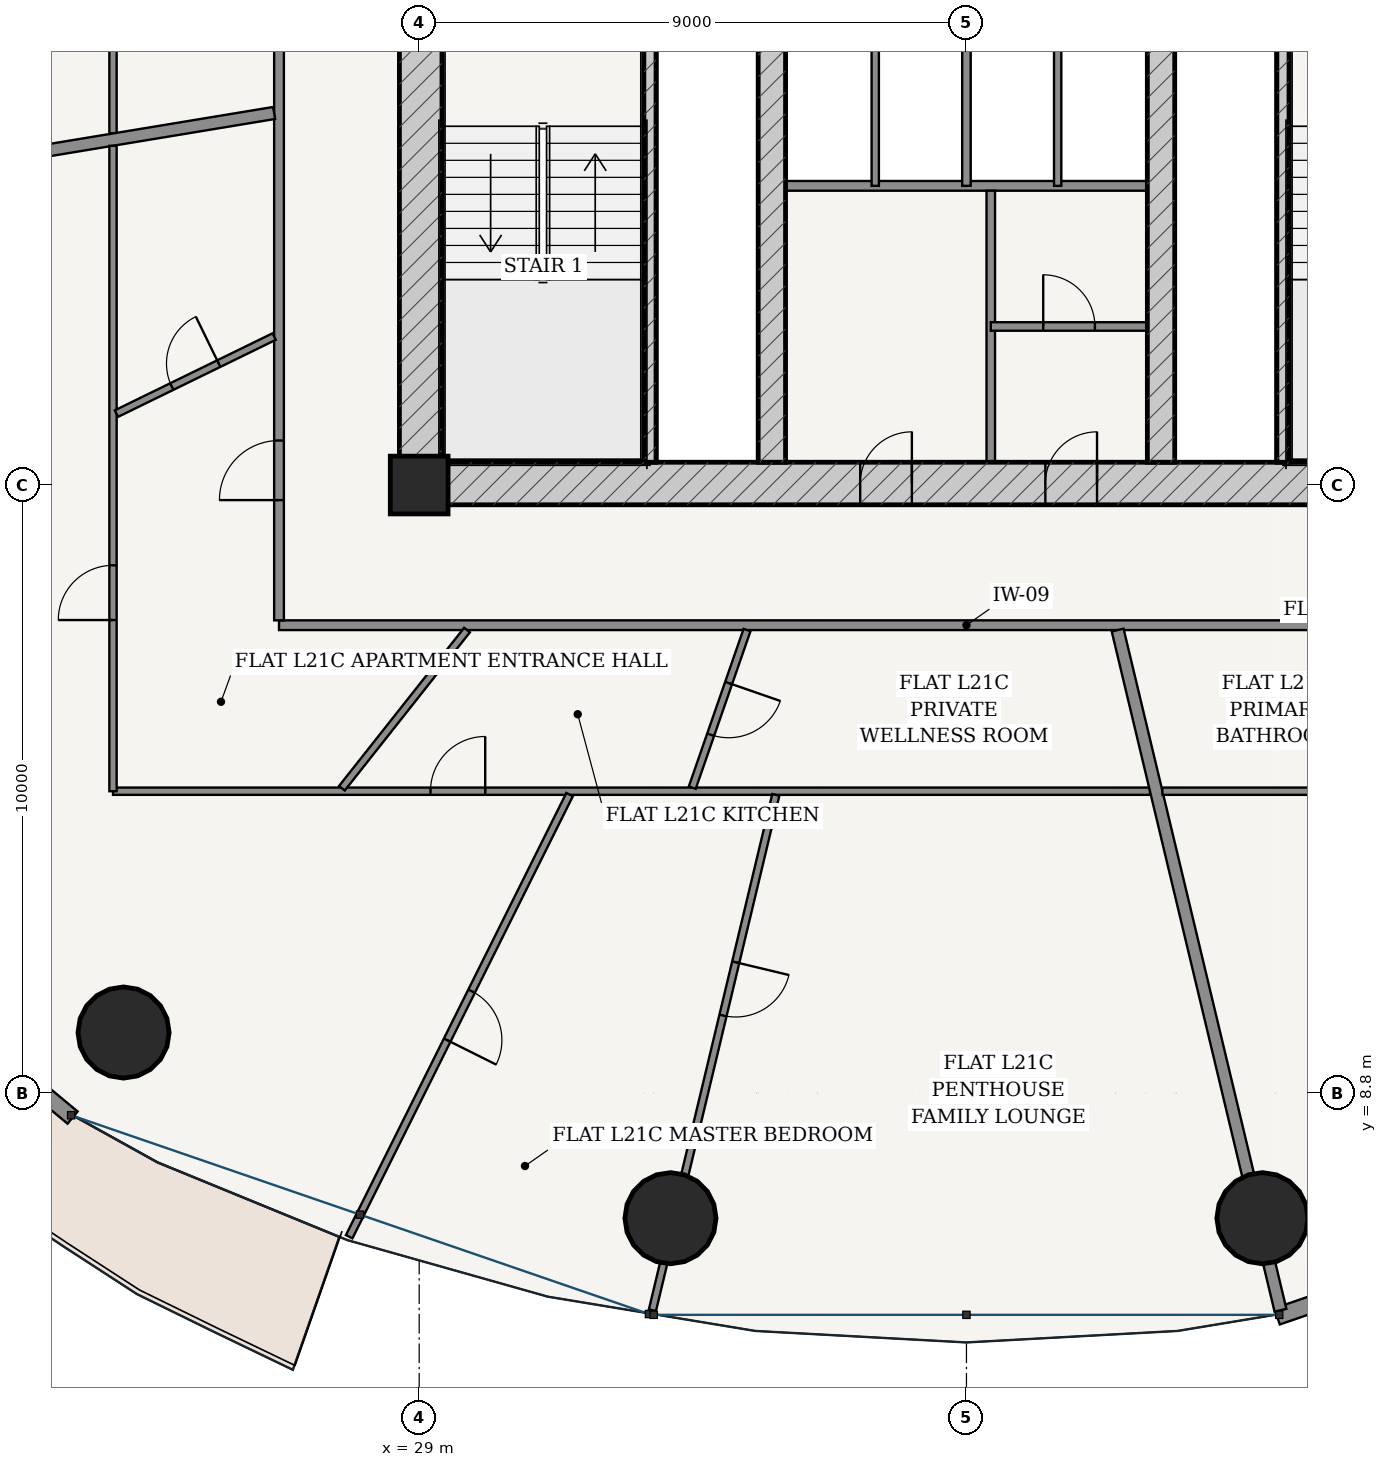
"""IFC4 building model, lengths in metres.
Left out: names, types, materials, properties, quantities, classifications, styles, units other than length and angle.
Written with IfcOpenShell. Run it as: python <this file> out.ifc"""

import sys

from ifc_helpers import new_model, si_unit, direction, frame, frame_2d, origin, origin_2d, place, context, subcontext, project, spatial, rectangle, hollow_circle, extrude, source, transform, mapped, element, fill, save


model = new_model("IFC4")
c1 = context("Model", 3, precision=1e-05, world=origin(), true_north=direction((-0.2419218956, 0.970295726276)))
c2 = subcontext(c1, "Body", "Model", "MODEL_VIEW")
j1 = project(units=[si_unit("LENGTHUNIT", "METRE"), si_unit("PLANEANGLEUNIT", "RADIAN")], contexts=[c1])
p1 = place(None, origin())
s1 = spatial("IfcSite", under=j1, at=p1, CompositionType="ELEMENT")
p2 = place(p1, origin())
s2 = spatial("IfcBuilding", under=s1, at=p2, CompositionType="ELEMENT")
p3 = place(p2, frame((0.0, 0.0, 83.4)))
s3 = spatial("IfcBuildingStorey", under=s2, at=p3, CompositionType="ELEMENT", Elevation=83.4)
p4 = place(p3, frame((29.0, 18.8, 0.0), z_axis=(0.0, 0.0, 1.0), x_axis=(1.0, 0.0, 0.0)))
e1 = element("IfcColumn", 1, at=p4, inside=s3, PredefinedType="COLUMN", context=c2, shape_type="SweptSolid", body=[
    extrude(rectangle(XDim=0.95, YDim=0.95, at=origin_2d()), origin(), (0.0, 0.0, 1.0), 3.6),
])
p5 = place(p3, frame((28.675, 18.825, 0.0), z_axis=(0.0, 0.0, 1.0), x_axis=(1.0, 0.0, 0.0)))
e2 = element("IfcWall", 2, at=p5, inside=s3, PredefinedType="SHEAR", context=c2, shape_type="SweptSolid", body=[
    extrude(rectangle(XDim=18.65, YDim=0.7, at=frame_2d((9.325, 0.0))), origin(), (0.0, 0.0, 1.0), 3.325),
])
p6 = place(p5, frame((7.577, 0.0, 0.0)))
e3 = element("IfcOpeningElement", 3, at=p6, cuts=e2, PredefinedType="OPENING", context=c2, shape_type="SweptSolid", body=[
    extrude(rectangle(XDim=0.85, YDim=2.1, at=frame_2d((0.425, 1.05))), frame((0.0, 0.36, 0.0), z_axis=(0.0, -1.0, 0.0), x_axis=(1.0, 0.0, 0.0)), (0.0, 0.0, 1.0), 0.72),
])
p7 = place(p5, frame((10.623, 0.0, 0.0)))
e4 = element("IfcOpeningElement", 4, at=p7, cuts=e2, PredefinedType="OPENING", context=c2, shape_type="SweptSolid", body=[
    extrude(rectangle(XDim=0.85, YDim=2.1, at=frame_2d((0.425, 1.05))), frame((0.0, 0.36, 0.0), z_axis=(0.0, -1.0, 0.0), x_axis=(1.0, 0.0, 0.0)), (0.0, 0.0, 1.0), 0.72),
])
p8 = place(p3, frame((29.025, 19.175, 0.0), z_axis=(0.0, 0.0, 1.0), x_axis=(0.0, 1.0, 0.0)))
e5 = element("IfcWall", 5, at=p8, inside=s3, PredefinedType="SHEAR", context=c2, shape_type="SweptSolid", body=[
    extrude(rectangle(XDim=15.25, YDim=0.7, at=frame_2d((7.625, 0.0))), origin(), (0.0, 0.0, 1.0), 3.325),
])
p9 = place(p8, frame((9.875, 0.0, 0.0)))
e6 = element("IfcOpeningElement", 6, at=p9, cuts=e5, PredefinedType="OPENING", context=c2, shape_type="SweptSolid", body=[
    extrude(rectangle(XDim=1.5, YDim=2.2, at=frame_2d((0.75, 1.1))), frame((0.0, 0.36, 0.0), z_axis=(0.0, -1.0, 0.0), x_axis=(1.0, 0.0, 0.0)), (0.0, 0.0, 1.0), 0.72),
])
for number, where, z_axis, x_axis in (
    (7, (32.795, 19.175, 0.0), (0.0, 0.0, 1.0), (0.0, 1.0, 0.0)),
    (8, (43.205, 19.175, 0.0), (0.0, 0.0, 1.0), (0.0, 1.0, 0.0)),
):
    element("IfcWall", number, at=place(p3, frame(where, z_axis=z_axis, x_axis=x_axis)), inside=s3, PredefinedType="SOLIDWALL", context=c2, shape_type="SweptSolid", body=[
        extrude(rectangle(XDim=7.375, YDim=0.2, at=frame_2d((3.688, 0.0))), origin(), (0.0, 0.0, 1.0), 3.325),
    ])
p10 = place(p3, frame((34.8, 19.175, 0.0), z_axis=(0.0, 0.0, 1.0), x_axis=(0.0, 1.0, 0.0)))
e9 = element("IfcWall", 9, at=p10, inside=s3, PredefinedType="SHEAR", context=c2, shape_type="SweptSolid", body=[
    extrude(rectangle(XDim=15.25, YDim=0.45, at=frame_2d((7.625, 0.0))), origin(), (0.0, 0.0, 1.0), 3.325),
])
p11 = place(p10, frame((7.8, 0.0, 0.0)))
e10 = element("IfcOpeningElement", 10, at=p11, cuts=e9, PredefinedType="OPENING", context=c2, shape_type="SweptSolid", body=[
    extrude(rectangle(XDim=1.05, YDim=2.15, at=frame_2d((0.525, 1.075))), frame((0.0, 0.235, 0.0), z_axis=(0.0, -1.0, 0.0), x_axis=(1.0, 0.0, 0.0)), (0.0, 0.0, 1.0), 0.47),
])
p12 = place(p3, frame((41.2, 19.175, 0.0), z_axis=(0.0, 0.0, 1.0), x_axis=(0.0, 1.0, 0.0)))
e11 = element("IfcWall", 11, at=p12, inside=s3, PredefinedType="SHEAR", context=c2, shape_type="SweptSolid", body=[
    extrude(rectangle(XDim=15.25, YDim=0.45, at=frame_2d((7.625, 0.0))), origin(), (0.0, 0.0, 1.0), 3.325),
])
p13 = place(p12, frame((7.8, 0.0, 0.0)))
e12 = element("IfcOpeningElement", 12, at=p13, cuts=e11, PredefinedType="OPENING", context=c2, shape_type="SweptSolid", body=[
    extrude(rectangle(XDim=1.05, YDim=2.15, at=frame_2d((0.525, 1.075))), frame((0.0, 0.235, 0.0), z_axis=(0.0, -1.0, 0.0), x_axis=(1.0, 0.0, 0.0)), (0.0, 0.0, 1.0), 0.47),
])
for number, where, z_axis, x_axis in (
    (13, (24.138, 9.796, 0.0), (0.0, 0.0, 1.0), (1.0, 0.0, 0.0)),
    (14, (33.133, 6.743, 0.0), (0.0, 0.0, 1.0), (1.0, 0.0, 0.0)),
    (15, (42.867, 6.743, 0.0), (0.0, 0.0, 1.0), (1.0, 0.0, 0.0)),
):
    element("IfcColumn", number, at=place(p3, frame(where, z_axis=z_axis, x_axis=x_axis)), inside=s3, PredefinedType="COLUMN", context=c2, shape_type="SweptSolid", body=[
        extrude(hollow_circle(Radius=0.75, WallThickness=0.045, at=origin_2d()), origin(), (0.0, 0.0, 1.0), 3.6),
    ])
p14 = place(p3, frame((15.846, 14.59, 0.0), z_axis=(0.0, 0.0, 1.0), x_axis=(0.769254958887, -0.638941944333, 0.0)))
e16 = element("IfcWall", 16, at=p14, inside=s3, PredefinedType="SOLIDWALL", context=c2, shape_type="SweptSolid", body=[
    extrude(rectangle(XDim=9.69, YDim=0.26, at=frame_2d((4.845, 0.0))), origin(), (0.0, 0.0, 1.0), 3.325),
])
p15 = place(p14, frame((4.17, 0.0, 0.0)))
e17 = element("IfcOpeningElement", 17, at=p15, cuts=e16, PredefinedType="OPENING", context=c2, shape_type="SweptSolid", body=[
    extrude(rectangle(XDim=1.35, YDim=2.2, at=frame_2d((0.675, 1.1))), frame((0.0, 0.14, 0.0), z_axis=(0.0, -1.0, 0.0), x_axis=(1.0, 0.0, 0.0)), (0.0, 0.0, 1.0), 0.28),
])
p16 = place(p3, frame((43.108, 5.128, 0.0), z_axis=(0.0, 0.0, 1.0), x_axis=(0.945590132341, 0.325360264351, 0.0)))
e18 = element("IfcWall", 18, at=p16, inside=s3, PredefinedType="SOLIDWALL", context=c2, shape_type="SweptSolid", body=[
    extrude(rectangle(XDim=10.289, YDim=0.28, at=frame_2d((5.145, 0.0))), origin(), (0.0, 0.0, 1.0), 3.325),
])
p17 = place(p16, frame((1.728, 0.0, 0.85)))
e19 = element("IfcOpeningElement", 19, at=p17, cuts=e18, PredefinedType="OPENING", context=c2, shape_type="SweptSolid", body=[
    extrude(rectangle(XDim=2.1, YDim=1.95, at=frame_2d((1.05, 0.975))), frame((0.0, 0.15, 0.0), z_axis=(0.0, -1.0, 0.0), x_axis=(1.0, 0.0, 0.0)), (0.0, 0.0, 1.0), 0.3),
])
p18 = place(p16, frame((6.461, 0.0, 0.85)))
e20 = element("IfcOpeningElement", 20, at=p18, cuts=e18, PredefinedType="OPENING", context=c2, shape_type="SweptSolid", body=[
    extrude(rectangle(XDim=2.1, YDim=1.95, at=frame_2d((1.05, 0.975))), frame((0.0, 0.15, 0.0), z_axis=(0.0, -1.0, 0.0), x_axis=(1.0, 0.0, 0.0)), (0.0, 0.0, 1.0), 0.3),
])
p19 = place(p3, frame((35.025, 23.72, 0.0), z_axis=(0.0, 0.0, 1.0), x_axis=(1.0, 0.0, 0.0)))
e21 = element("IfcWall", 21, at=p19, inside=s3, PredefinedType="PARTITIONING", context=c2, shape_type="SweptSolid", body=[
    extrude(rectangle(XDim=5.95, YDim=0.16, at=frame_2d((2.975, 0.0))), origin(), (0.0, 0.0, 1.0), 3.325),
])
p20 = place(p3, frame((36.5, 23.72, 0.0), z_axis=(0.0, 0.0, 1.0), x_axis=(0.0, 1.0, 0.0)))
e22 = element("IfcWall", 22, at=p20, inside=s3, PredefinedType="PARTITIONING", context=c2, shape_type="SweptSolid", body=[
    extrude(rectangle(XDim=2.56, YDim=0.12, at=frame_2d((1.28, 0.0))), origin(), (0.0, 0.0, 1.0), 3.325),
])
p21 = place(p3, frame((38.0, 23.72, 0.0), z_axis=(0.0, 0.0, 1.0), x_axis=(0.0, 1.0, 0.0)))
e23 = element("IfcWall", 23, at=p21, inside=s3, PredefinedType="PARTITIONING", context=c2, shape_type="SweptSolid", body=[
    extrude(rectangle(XDim=2.56, YDim=0.14, at=frame_2d((1.28, 0.0))), origin(), (0.0, 0.0, 1.0), 3.325),
])
p22 = place(p3, frame((39.5, 23.72, 0.0), z_axis=(0.0, 0.0, 1.0), x_axis=(0.0, 1.0, 0.0)))
e24 = element("IfcWall", 24, at=p22, inside=s3, PredefinedType="PARTITIONING", context=c2, shape_type="SweptSolid", body=[
    extrude(rectangle(XDim=2.56, YDim=0.12, at=frame_2d((1.28, 0.0))), origin(), (0.0, 0.0, 1.0), 3.325),
])
p23 = place(p3, frame((38.4, 19.175, 0.0), z_axis=(0.0, 0.0, 1.0), x_axis=(0.0, 1.0, 0.0)))
e25 = element("IfcWall", 25, at=p23, inside=s3, PredefinedType="PARTITIONING", context=c2, shape_type="SweptSolid", body=[
    extrude(rectangle(XDim=4.465, YDim=0.14, at=frame_2d((2.232, 0.0))), origin(), (0.0, 0.0, 1.0), 3.325),
])
p24 = place(p3, frame((38.4, 21.407, 0.0), z_axis=(0.0, 0.0, 1.0), x_axis=(1.0, 0.0, 0.0)))
e26 = element("IfcWall", 26, at=p24, inside=s3, PredefinedType="PARTITIONING", context=c2, shape_type="SweptSolid", body=[
    extrude(rectangle(XDim=2.575, YDim=0.14, at=frame_2d((1.288, 0.0))), origin(), (0.0, 0.0, 1.0), 3.325),
])
p25 = place(p24, frame((0.863, 0.0, 0.0)))
e27 = element("IfcOpeningElement", 27, at=p25, cuts=e26, PredefinedType="OPENING", context=c2, shape_type="SweptSolid", body=[
    extrude(rectangle(XDim=0.85, YDim=2.1, at=frame_2d((0.425, 1.05))), frame((0.0, 0.08, 0.0), z_axis=(0.0, -1.0, 0.0), x_axis=(1.0, 0.0, 0.0)), (0.0, 0.0, 1.0), 0.16),
])
p26 = place(p3, frame((26.695, 16.495, 0.0), z_axis=(0.0, 0.0, 1.0), x_axis=(1.0, 0.0, 0.0)))
e28 = element("IfcWall", 28, at=p26, inside=s3, PredefinedType="PARTITIONING", context=c2, shape_type="SweptSolid", body=[
    extrude(rectangle(XDim=22.61, YDim=0.16, at=frame_2d((11.305, 0.0))), origin(), (0.0, 0.0, 1.0), 2.767),
])
p27 = place(p3, frame((26.695, 16.575, 0.0), z_axis=(0.0, 0.0, 1.0), x_axis=(0.0, 1.0, 0.0)))
e29 = element("IfcWall", 29, at=p27, inside=s3, PredefinedType="PARTITIONING", context=c2, shape_type="SweptSolid", body=[
    extrude(rectangle(XDim=20.45, YDim=0.16, at=frame_2d((10.225, 0.0))), origin(), (0.0, 0.0, 1.0), 2.767),
])
p28 = place(p27, frame((1.977, 0.0, 0.0)))
e30 = element("IfcOpeningElement", 30, at=p28, cuts=e29, PredefinedType="OPENING", context=c2, shape_type="SweptSolid", body=[
    extrude(rectangle(XDim=0.98, YDim=2.2, at=frame_2d((0.49, 1.1))), frame((0.0, 0.09, 0.0), z_axis=(0.0, -1.0, 0.0), x_axis=(1.0, 0.0, 0.0)), (0.0, 0.0, 1.0), 0.18),
])
p29 = place(p3, frame((23.965, 24.583, 0.0), z_axis=(0.0, 0.0, 1.0), x_axis=(0.0, 1.0, 0.0)))
e31 = element("IfcWall", 31, at=p29, inside=s3, PredefinedType="PARTITIONING", context=c2, shape_type="SweptSolid", body=[
    extrude(rectangle(XDim=15.252, YDim=0.12, at=frame_2d((7.626, 0.0))), origin(), (0.0, 0.0, 1.0), 2.767),
])
p30 = place(p3, frame((26.615, 24.918, 0.0), z_axis=(0.0, 0.0, 1.0), x_axis=(-0.986618789677, -0.163044054958, 0.0)))
e32 = element("IfcWall", 32, at=p30, inside=s3, PredefinedType="PARTITIONING", context=c2, shape_type="SweptSolid", body=[
    extrude(rectangle(XDim=14.787, YDim=0.2, at=frame_2d((7.393, 0.0))), origin(), (0.0, 0.0, 1.0), 2.767),
])
p31 = place(p3, frame((41.019, 13.765, 0.0), z_axis=(0.0, 0.0, 1.0), x_axis=(-1.0, 0.0, 0.0)))
e33 = element("IfcWall", 33, at=p31, inside=s3, PredefinedType="PARTITIONING", context=c2, shape_type="SweptSolid", body=[
    extrude(rectangle(XDim=17.054, YDim=0.12, at=frame_2d((8.527, 0.0))), origin(), (0.0, 0.0, 1.0), 2.767),
])
p32 = place(p31, frame((10.933, 0.0, 0.0)))
e34 = element("IfcOpeningElement", 34, at=p32, cuts=e33, PredefinedType="OPENING", context=c2, shape_type="SweptSolid", body=[
    extrude(rectangle(XDim=0.9, YDim=2.15, at=frame_2d((0.45, 1.075))), frame((0.0, 0.07, 0.0), z_axis=(0.0, -1.0, 0.0), x_axis=(1.0, 0.0, 0.0)), (0.0, 0.0, 1.0), 0.14),
])
p33 = place(p3, frame((23.965, 13.765, 0.0), z_axis=(0.0, 0.0, 1.0), x_axis=(0.0, 1.0, 0.0)))
e35 = element("IfcWall", 35, at=p33, inside=s3, PredefinedType="PARTITIONING", context=c2, shape_type="SweptSolid", body=[
    extrude(rectangle(XDim=10.614, YDim=0.12, at=frame_2d((5.307, 0.0))), origin(), (0.0, 0.0, 1.0), 2.767),
])
p34 = place(p33, frame((2.815, 0.0, 0.0)))
e36 = element("IfcOpeningElement", 36, at=p34, cuts=e35, PredefinedType="OPENING", context=c2, shape_type="SweptSolid", body=[
    extrude(rectangle(XDim=0.9, YDim=2.15, at=frame_2d((0.45, 1.075))), frame((0.0, 0.07, 0.0), z_axis=(0.0, -1.0, 0.0), x_axis=(1.0, 0.0, 0.0)), (0.0, 0.0, 1.0), 0.14),
])
p35 = place(p3, frame((31.474, 13.709, 0.0), z_axis=(0.0, 0.0, 1.0), x_axis=(-0.446179583353, -0.894943450392, 0.0)))
e37 = element("IfcWall", 37, at=p35, inside=s3, PredefinedType="PARTITIONING", context=c2, shape_type="SweptSolid", body=[
    extrude(rectangle(XDim=8.125, YDim=0.12, at=frame_2d((4.062, 0.0))), origin(), (0.0, 0.0, 1.0), 2.767),
])
p36 = place(p35, frame((3.612, 0.0, 0.0)))
e38 = element("IfcOpeningElement", 38, at=p36, cuts=e37, PredefinedType="OPENING", context=c2, shape_type="SweptSolid", body=[
    extrude(rectangle(XDim=0.9, YDim=2.15, at=frame_2d((0.45, 1.075))), frame((0.0, 0.07, 0.0), z_axis=(0.0, -1.0, 0.0), x_axis=(1.0, 0.0, 0.0)), (0.0, 0.0, 1.0), 0.14),
])
p37 = place(p3, frame((34.865, 13.705, 0.0), z_axis=(0.0, 0.0, 1.0), x_axis=(-0.23282725047, -0.97251810854, 0.0)))
e39 = element("IfcWall", 39, at=p37, inside=s3, PredefinedType="PARTITIONING", context=c2, shape_type="SweptSolid", body=[
    extrude(rectangle(XDim=8.715, YDim=0.12, at=frame_2d((4.357, 0.0))), origin(), (0.0, 0.0, 1.0), 2.767),
])
p38 = place(p37, frame((2.831, 0.0, 0.0)))
e40 = element("IfcOpeningElement", 40, at=p38, cuts=e39, PredefinedType="OPENING", context=c2, shape_type="SweptSolid", body=[
    extrude(rectangle(XDim=0.9, YDim=2.15, at=frame_2d((0.45, 1.075))), frame((0.0, 0.07, 0.0), z_axis=(0.0, -1.0, 0.0), x_axis=(1.0, 0.0, 0.0)), (0.0, 0.0, 1.0), 0.14),
])
p39 = place(p3, frame((26.615, 21.241, 0.0), z_axis=(0.0, 0.0, 1.0), x_axis=(-0.898615592274, -0.438736842906, 0.0)))
e41 = element("IfcWall", 41, at=p39, inside=s3, PredefinedType="PARTITIONING", context=c2, shape_type="SweptSolid", body=[
    extrude(rectangle(XDim=2.887, YDim=0.12, at=frame_2d((1.443, 0.0))), origin(), (0.0, 0.0, 1.0), 3.325),
])
p40 = place(p39, frame((1.013, 0.0, 0.0)))
e42 = element("IfcOpeningElement", 42, at=p40, cuts=e41, PredefinedType="OPENING", context=c2, shape_type="SweptSolid", body=[
    extrude(rectangle(XDim=0.86, YDim=2.15, at=frame_2d((0.43, 1.075))), frame((0.0, 0.07, 0.0), z_axis=(0.0, -1.0, 0.0), x_axis=(1.0, 0.0, 0.0)), (0.0, 0.0, 1.0), 0.14),
])
p41 = place(p3, frame((29.787, 16.415, 0.0), z_axis=(0.0, 0.0, 1.0), x_axis=(-0.62033143471, -0.784339793145, 0.0)))
e43 = element("IfcWall", 43, at=p41, inside=s3, PredefinedType="PARTITIONING", context=c2, shape_type="SweptSolid", body=[
    extrude(rectangle(XDim=3.317, YDim=0.12, at=frame_2d((1.658, 0.0))), origin(), (0.0, 0.0, 1.0), 3.004),
])
p42 = place(p3, frame((34.392, 16.415, 0.0), z_axis=(0.0, 0.0, 1.0), x_axis=(-0.328268661855, -0.94458439837, 0.0)))
e44 = element("IfcWall", 44, at=p42, inside=s3, PredefinedType="PARTITIONING", context=c2, shape_type="SweptSolid", body=[
    extrude(rectangle(XDim=2.744, YDim=0.12, at=frame_2d((1.372, 0.0))), origin(), (0.0, 0.0, 1.0), 3.325),
])
p43 = place(p42, frame((0.922, 0.0, 0.0)))
e45 = element("IfcOpeningElement", 45, at=p43, cuts=e44, PredefinedType="OPENING", context=c2, shape_type="SweptSolid", body=[
    extrude(rectangle(XDim=0.9, YDim=2.15, at=frame_2d((0.45, 1.075))), frame((0.0, 0.07, 0.0), z_axis=(0.0, -1.0, 0.0), x_axis=(1.0, 0.0, 0.0)), (0.0, 0.0, 1.0), 0.14),
])
p44 = place(p3, frame((40.486, 16.415, 0.0), z_axis=(0.0, 0.0, 1.0), x_axis=(0.232829417917, -0.972517589636, 0.0)))
e46 = element("IfcWall", 46, at=p44, inside=s3, PredefinedType="PARTITIONING", context=c2, shape_type="SweptSolid", body=[
    extrude(rectangle(XDim=11.502, YDim=0.2, at=frame_2d((5.751, 0.0))), origin(), (0.0, 0.0, 1.0), 2.767),
])
p45 = place(p3, frame((52.035, 13.765, 0.0), z_axis=(0.0, 0.0, 1.0), x_axis=(-1.0, 0.0, 0.0)))
e47 = element("IfcWall", 47, at=p45, inside=s3, PredefinedType="PARTITIONING", context=c2, shape_type="SweptSolid", body=[
    extrude(rectangle(XDim=10.812, YDim=0.12, at=frame_2d((5.406, 0.0))), origin(), (0.0, 0.0, 1.0), 2.767),
])
p46 = place(p45, frame((2.145, 0.0, 0.0)))
e48 = element("IfcOpeningElement", 48, at=p46, cuts=e47, PredefinedType="OPENING", context=c2, shape_type="SweptSolid", body=[
    extrude(rectangle(XDim=0.9, YDim=2.15, at=frame_2d((0.45, 1.075))), frame((0.0, 0.07, 0.0), z_axis=(0.0, -1.0, 0.0), x_axis=(1.0, 0.0, 0.0)), (0.0, 0.0, 1.0), 0.14),
])
m1 = source(origin(), c2, "Body", "SweptSolid", [
    extrude(rectangle(XDim=0.85, YDim=2.1, at=frame_2d((0.425, 1.05))), frame((0.0, 0.025, 0.0), z_axis=(0.0, -1.0, 0.0), x_axis=(1.0, 0.0, 0.0)), (0.0, 0.0, 1.0), 0.05),
])
p47 = place(p6, origin())
e49 = element("IfcDoor", 49, at=p47, inside=s3, OperationType="SINGLE_SWING_RIGHT", PredefinedType="DOOR", context=c2, shape_type="MappedRepresentation", body=[
    mapped(m1, transform((0.0, 0.0, 0.0), scale=1.0)),
])
fill(e3, e49)
p48 = place(p7, origin())
e50 = element("IfcDoor", 50, at=p48, inside=s3, OperationType="SINGLE_SWING_RIGHT", PredefinedType="DOOR", context=c2, shape_type="MappedRepresentation", body=[
    mapped(m1, transform((0.0, 0.0, 0.0), scale=1.0)),
])
fill(e4, e50)
p49 = place(p25, origin())
e51 = element("IfcDoor", 51, at=p49, inside=s3, OperationType="SINGLE_SWING_LEFT", PredefinedType="DOOR", context=c2, shape_type="MappedRepresentation", body=[
    mapped(m1, transform((0.0, 0.0, 0.0), scale=1.0)),
])
fill(e27, e51)
m2 = source(origin(), c2, "Body", "SweptSolid", [
    extrude(rectangle(XDim=0.98, YDim=2.2, at=frame_2d((0.49, 1.1))), frame((0.0, 0.025, 0.0), z_axis=(0.0, -1.0, 0.0), x_axis=(1.0, 0.0, 0.0)), (0.0, 0.0, 1.0), 0.05),
])
p50 = place(p28, origin())
e52 = element("IfcDoor", 52, at=p50, inside=s3, OperationType="SINGLE_SWING_LEFT", PredefinedType="DOOR", context=c2, shape_type="MappedRepresentation", body=[
    mapped(m2, transform((0.0, 0.0, 0.0), scale=1.0)),
])
fill(e30, e52)
m3 = source(origin(), c2, "Body", "SweptSolid", [
    extrude(rectangle(XDim=0.86, YDim=2.15, at=frame_2d((0.43, 1.075))), frame((0.0, 0.025, 0.0), z_axis=(0.0, -1.0, 0.0), x_axis=(1.0, 0.0, 0.0)), (0.0, 0.0, 1.0), 0.05),
])
p51 = place(p40, frame((0.86, 0.0, 0.0), z_axis=(0.0, 0.0, 1.0), x_axis=(-1.0, 0.0, 0.0)))
e53 = element("IfcDoor", 53, at=p51, inside=s3, OperationType="SINGLE_SWING_RIGHT", PredefinedType="DOOR", context=c2, shape_type="MappedRepresentation", body=[
    mapped(m3, transform((0.0, 0.0, 0.0), scale=1.0)),
])
fill(e42, e53)
m4 = source(origin(), c2, "Body", "SweptSolid", [
    extrude(rectangle(XDim=0.9, YDim=2.15, at=frame_2d((0.45, 1.075))), frame((0.0, 0.025, 0.0), z_axis=(0.0, -1.0, 0.0), x_axis=(1.0, 0.0, 0.0)), (0.0, 0.0, 1.0), 0.05),
])
p52 = place(p34, origin())
e54 = element("IfcDoor", 54, at=p52, inside=s3, OperationType="SINGLE_SWING_LEFT", PredefinedType="DOOR", context=c2, shape_type="MappedRepresentation", body=[
    mapped(m4, transform((0.0, 0.0, 0.0), scale=1.0)),
])
fill(e36, e54)
p53 = place(p32, frame((0.9, 0.0, 0.0), z_axis=(0.0, 0.0, 1.0), x_axis=(-1.0, 0.0, 0.0)))
e55 = element("IfcDoor", 55, at=p53, inside=s3, OperationType="SINGLE_SWING_RIGHT", PredefinedType="DOOR", context=c2, shape_type="MappedRepresentation", body=[
    mapped(m4, transform((0.0, 0.0, 0.0), scale=1.0)),
])
fill(e34, e55)
p54 = place(p43, origin())
e56 = element("IfcDoor", 56, at=p54, inside=s3, OperationType="SINGLE_SWING_LEFT", PredefinedType="DOOR", context=c2, shape_type="MappedRepresentation", body=[
    mapped(m4, transform((0.0, 0.0, 0.0), scale=1.0)),
])
fill(e45, e56)
p55 = place(p36, origin())
e57 = element("IfcDoor", 57, at=p55, inside=s3, OperationType="SINGLE_SWING_RIGHT", PredefinedType="DOOR", context=c2, shape_type="MappedRepresentation", body=[
    mapped(m4, transform((0.0, 0.0, 0.0), scale=1.0)),
])
fill(e38, e57)
p56 = place(p38, origin())
e58 = element("IfcDoor", 58, at=p56, inside=s3, OperationType="SINGLE_SWING_LEFT", PredefinedType="DOOR", context=c2, shape_type="MappedRepresentation", body=[
    mapped(m4, transform((0.0, 0.0, 0.0), scale=1.0)),
])
fill(e40, e58)
save(model, sys.argv[1])
